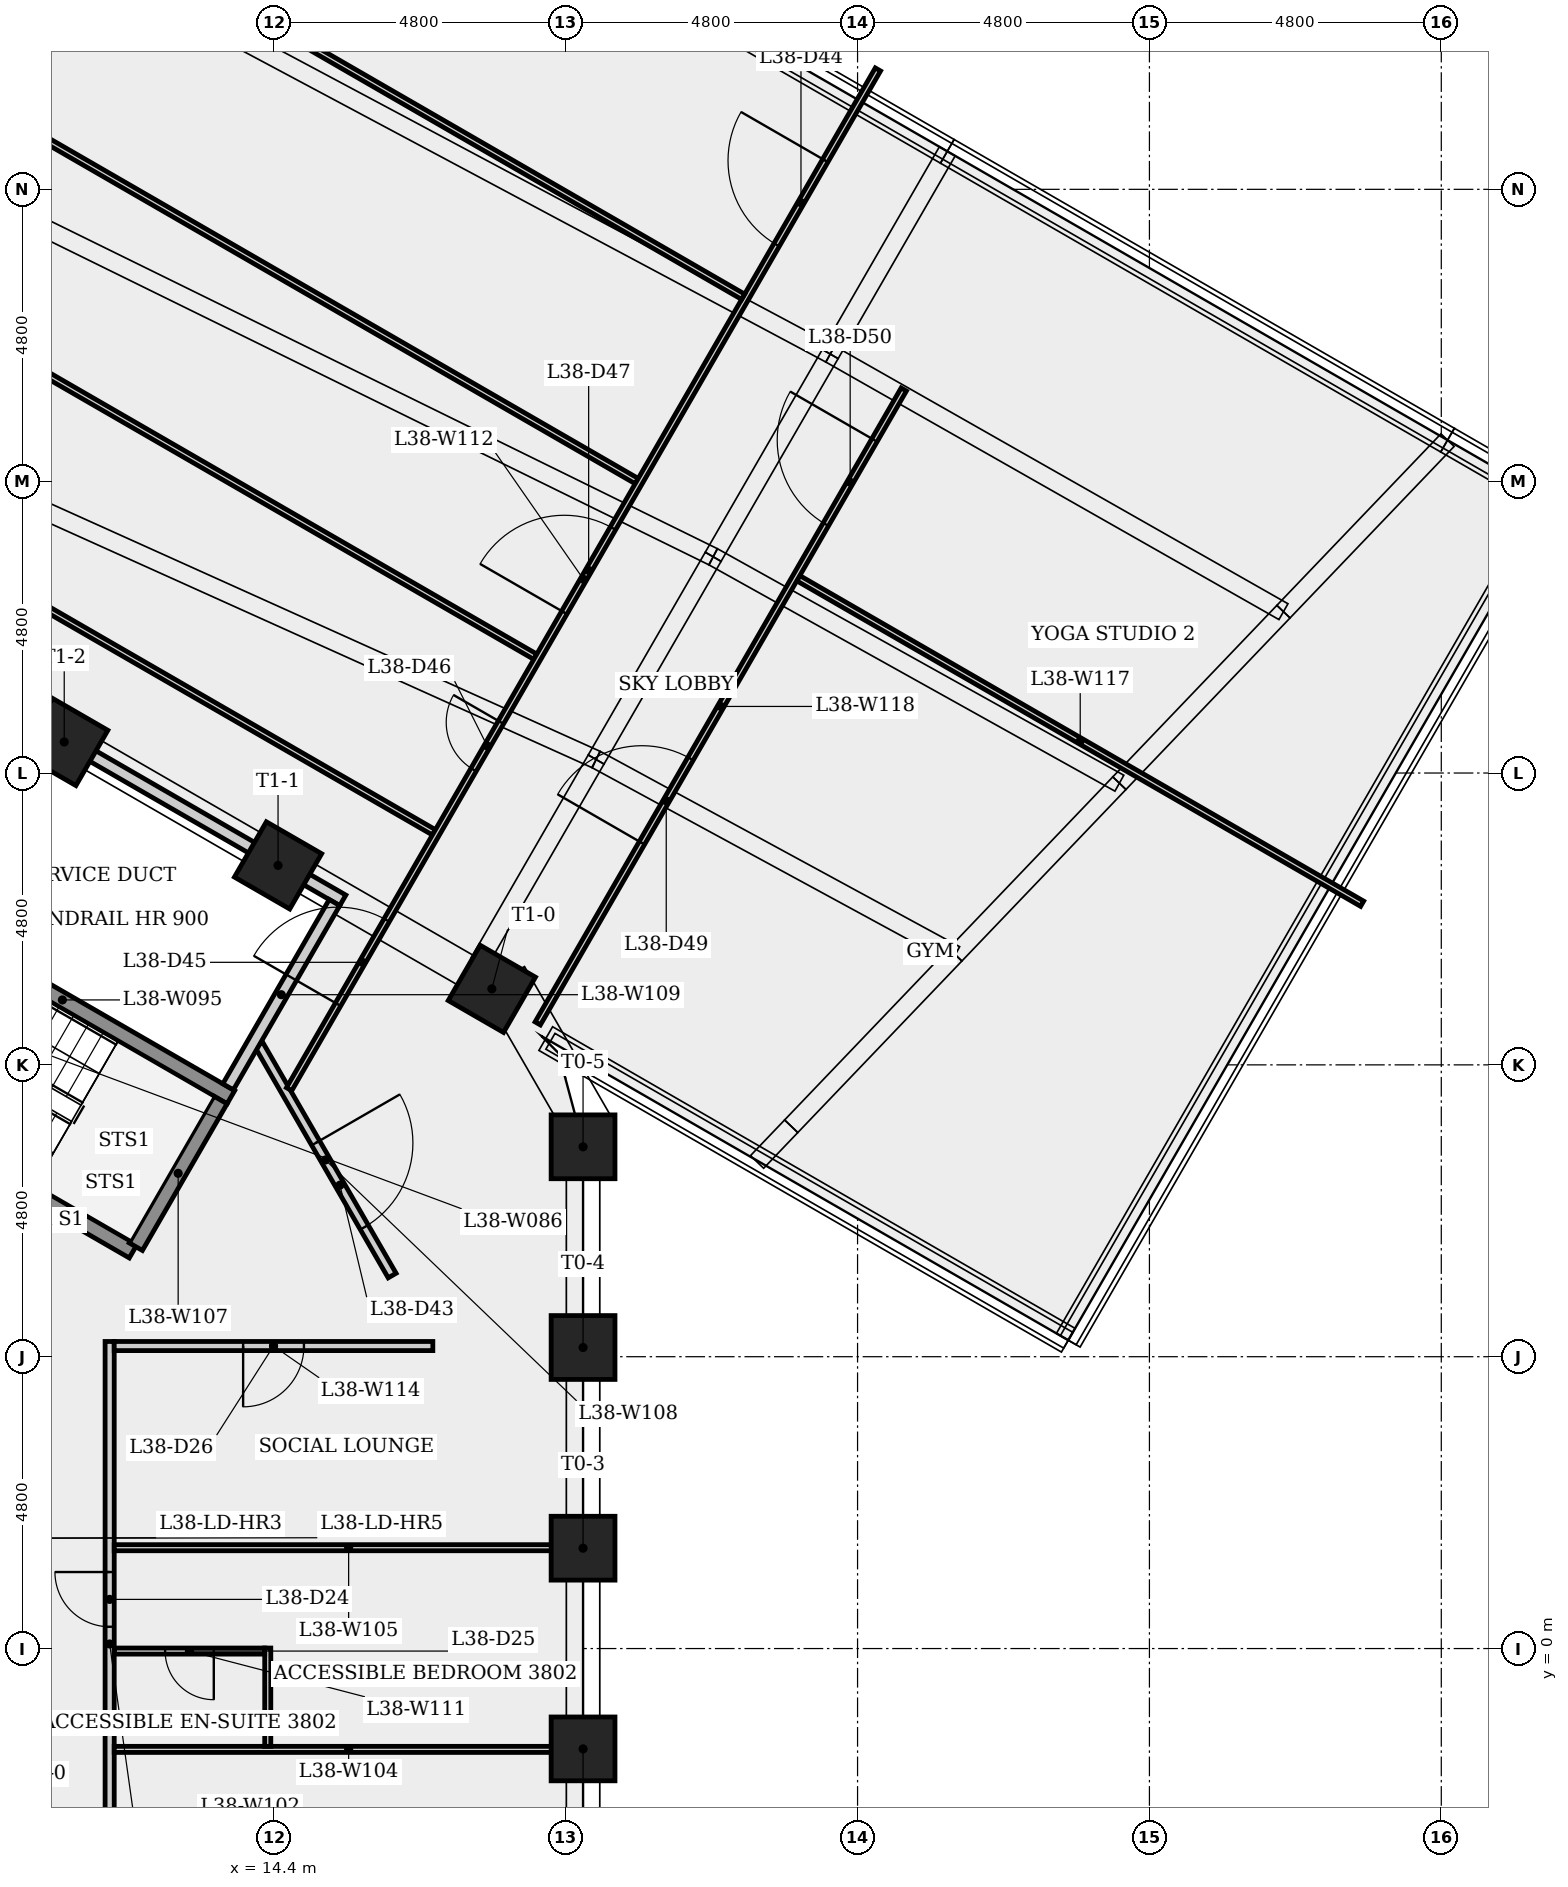
"""IFC4 building model, lengths in metres.
Left out: names, types, materials, properties, quantities, classifications, styles, units other than length and angle.
Written with IfcOpenShell. Run it as: python <this file> out.ifc"""

import sys

from ifc_helpers import new_model, si_unit, direction, frame, frame_2d, origin, origin_2d, place, context, subcontext, project, spatial, rectangle, extrude, element, fill, save


model = new_model("IFC4")
c1 = context("Model", 3, precision=1e-05, world=origin(), true_north=direction((0.0, 1.0)))
c2 = subcontext(c1, "Body", "Model", "MODEL_VIEW")
j1 = project(units=[si_unit("LENGTHUNIT", "METRE"), si_unit("PLANEANGLEUNIT", "RADIAN")], contexts=[c1])
p1 = place(None, origin())
s1 = spatial("IfcSite", under=j1, at=p1, CompositionType="ELEMENT")
p2 = place(p1, origin())
s2 = spatial("IfcBuilding", under=s1, at=p2, CompositionType="ELEMENT")
p3 = place(p2, frame((0.0, 0.0, 143.9)))
s3 = spatial("IfcBuildingStorey", under=s2, at=p3, CompositionType="ELEMENT", Elevation=143.9)
for number, where, z_axis, x_axis in (
    (1, (19.486, -1.65, 0.0), (0.0, 0.0, 1.0), (1.0, 0.0, 0.0)),
    (2, (19.486, 1.65, 0.0), (0.0, 0.0, 1.0), (1.0, 0.0, 0.0)),
    (3, (19.486, 4.951, 0.0), (0.0, 0.0, 1.0), (1.0, 0.0, 0.0)),
    (4, (19.486, 8.252, 0.0), (0.0, 0.0, 1.0), (1.0, 0.0, 0.0)),
    (5, (17.986, 10.85, 0.0), (0.0, 0.0, 1.0), (0.5, 0.866, 0.0)),
    (6, (14.469, 12.88, 0.0), (0.0, 0.0, 1.0), (0.5, 0.866, 0.0)),
    (7, (10.953, 14.911, 0.0), (0.0, 0.0, 1.0), (0.5, 0.866, 0.0)),
):
    element("IfcColumn", number, at=place(p3, frame(where, z_axis=z_axis, x_axis=x_axis)), inside=s3, PredefinedType="COLUMN", context=c2, shape_type="SweptSolid", body=[
        extrude(rectangle(XDim=1.05, YDim=1.05, at=origin_2d()), origin(), (0.0, 0.0, 1.0), 4.0),
    ])
for number, where, z_axis, x_axis in (
    (8, (-4.951, 26.117, 0.0), (0.0, 0.0, 1.0), (0.866, -0.5, 0.0)),
    (9, (-3.283, 29.005, 0.0), (0.0, 0.0, 1.0), (0.866, -0.5, 0.0)),
    (10, (-1.615, 31.894, 0.0), (0.0, 0.0, 1.0), (0.866, -0.5, 0.0)),
):
    element("IfcWall", number, at=place(p3, frame(where, z_axis=z_axis, x_axis=x_axis)), inside=s3, PredefinedType="PARTITIONING", context=c2, shape_type="SweptSolid", body=[
        extrude(rectangle(XDim=25.385, YDim=0.1, at=frame_2d((12.692, 0.0))), origin(), (0.0, 0.0, 1.0), 3.6),
    ])
p4 = place(p3, frame((3.063, 19.506, 0.0), z_axis=(0.0, 0.0, 1.0), x_axis=(0.866025783705, -0.499999341958, 0.0)))
e11 = element("IfcWall", 11, at=p4, inside=s3, PredefinedType="PLUMBINGWALL", context=c2, shape_type="SweptSolid", body=[
    extrude(rectangle(XDim=14.4, YDim=0.2, at=frame_2d((7.2, 0.0))), origin(), (0.0, 0.0, 1.0), 2.725),
])
p5 = place(p3, frame((8.151, 12.268, 0.0), z_axis=(0.0, 0.0, 1.0), x_axis=(0.866025499775, -0.499999833739, 0.0)))
e12 = element("IfcWall", 12, at=p5, inside=s3, PredefinedType="SHEAR", context=c2, shape_type="SweptSolid", body=[
    extrude(rectangle(XDim=6.4, YDim=0.25, at=frame_2d((3.2, 0.0))), origin(), (0.0, 0.0, 1.0), 3.6),
])
p6 = place(p3, frame((11.1, 7.101, 0.0), z_axis=(0.0, 0.0, 1.0), x_axis=(-0.8660265141, 0.499998076872, 0.0)))
e13 = element("IfcWall", 13, at=p6, inside=s3, PredefinedType="SHEAR", context=c2, shape_type="SweptSolid", body=[
    extrude(rectangle(XDim=5.137, YDim=0.25, at=frame_2d((2.569, 0.0))), origin(), (0.0, 0.0, 1.0), 3.6),
])
p7 = place(p6, frame((3.987, 0.0, 0.0)))
e14 = element("IfcOpeningElement", 14, at=p7, cuts=e13, PredefinedType="OPENING", context=c2, shape_type="SweptSolid", body=[
    extrude(rectangle(XDim=1.0, YDim=2.1, at=frame_2d((0.5, 1.05))), frame((0.0, 0.135, 0.0), z_axis=(0.0, -1.0, 0.0), x_axis=(1.0, 0.0, 0.0)), (0.0, 0.0, 1.0), 0.27),
])
p8 = place(p3, frame((11.7, -4.9, 0.0), z_axis=(0.0, 0.0, 1.0), x_axis=(0.0, 1.0, 0.0)))
e15 = element("IfcWall", 15, at=p8, inside=s3, PredefinedType="PARTITIONING", context=c2, shape_type="SweptSolid", body=[
    extrude(rectangle(XDim=9.951, YDim=0.15, at=frame_2d((4.976, 0.0))), origin(), (0.0, 0.0, 1.0), 3.6),
])
p9 = place(p8, frame((5.259, 0.0, 0.0)))
e16 = element("IfcOpeningElement", 16, at=p9, cuts=e15, PredefinedType="OPENING", context=c2, shape_type="SweptSolid", body=[
    extrude(rectangle(XDim=0.9, YDim=2.1, at=frame_2d((0.45, 1.05))), frame((0.0, 0.085, 0.0), z_axis=(0.0, -1.0, 0.0), x_axis=(1.0, 0.0, 0.0)), (0.0, 0.0, 1.0), 0.17),
])
for number, where, z_axis, x_axis in (
    (17, (11.775, -1.658, 0.0), (0.0, 0.0, 1.0), (1.0, 0.0, 0.0)),
    (18, (11.775, 1.658, 0.0), (0.0, 0.0, 1.0), (1.0, 0.0, 0.0)),
):
    element("IfcWall", number, at=place(p3, frame(where, z_axis=z_axis, x_axis=x_axis)), inside=s3, PredefinedType="PARTITIONING", context=c2, shape_type="SweptSolid", body=[
        extrude(rectangle(XDim=7.711, YDim=0.1, at=frame_2d((3.855, 0.0))), origin(), (0.0, 0.0, 1.0), 3.6),
    ])
p10 = place(p3, frame((12.085, 6.532, 0.0), z_axis=(0.0, 0.0, 1.0), x_axis=(-0.86604373436, 0.499968249168, 0.0)))
e19 = element("IfcWall", 19, at=p10, inside=s3, PredefinedType="SHEAR", context=c2, shape_type="SweptSolid", body=[
    extrude(rectangle(XDim=1.118, YDim=0.25, at=frame_2d((0.559, 0.0))), origin(), (0.0, 0.0, 1.0), 3.6),
])
p11 = place(p3, frame((13.523, 9.022, 0.0), z_axis=(0.0, 0.0, 1.0), x_axis=(-0.500013277472, -0.866017737897, 0.0)))
e20 = element("IfcWall", 20, at=p11, inside=s3, PredefinedType="SHEAR", context=c2, shape_type="SweptSolid", body=[
    extrude(rectangle(XDim=2.786, YDim=0.25, at=frame_2d((1.393, 0.0))), origin(), (0.0, 0.0, 1.0), 3.6),
])
p12 = place(p3, frame((14.151, 9.937, 0.0), z_axis=(0.0, 0.0, 1.0), x_axis=(0.500038547485, -0.86600314724, 0.0)))
e21 = element("IfcWall", 21, at=p12, inside=s3, PredefinedType="PARTITIONING", context=c2, shape_type="SweptSolid", body=[
    extrude(rectangle(XDim=4.39, YDim=0.15, at=frame_2d((2.195, 0.0))), origin(), (0.0, 0.0, 1.0), 3.6),
])
p13 = place(p12, frame((1.873, 0.0, 0.0)))
e22 = element("IfcOpeningElement", 22, at=p13, cuts=e21, PredefinedType="OPENING", context=c2, shape_type="SweptSolid", body=[
    extrude(rectangle(XDim=1.6, YDim=2.1, at=frame_2d((0.8, 1.05))), frame((0.0, 0.085, 0.0), z_axis=(0.0, -1.0, 0.0), x_axis=(1.0, 0.0, 0.0)), (0.0, 0.0, 1.0), 0.17),
])
p14 = place(p3, frame((13.648, 9.239, 0.0), z_axis=(0.0, 0.0, 1.0), x_axis=(0.49996604514, 0.866045006744, 0.0)))
e23 = element("IfcWall", 23, at=p14, inside=s3, PredefinedType="PLUMBINGWALL", context=c2, shape_type="SweptSolid", body=[
    extrude(rectangle(XDim=3.499, YDim=0.2, at=frame_2d((1.75, 0.0))), origin(), (0.0, 0.0, 1.0), 3.6),
])
p15 = place(p3, frame((14.3, -1.608, 0.0), z_axis=(0.0, 0.0, 1.0), x_axis=(0.0, 1.0, 0.0)))
e24 = element("IfcWall", 24, at=p15, inside=s3, PredefinedType="PARTITIONING", context=c2, shape_type="SweptSolid", body=[
    extrude(rectangle(XDim=1.617, YDim=0.1, at=frame_2d((0.809, 0.0))), origin(), (0.0, 0.0, 1.0), 3.6),
])
p16 = place(p3, frame((14.25, -0.042, 0.0), z_axis=(0.0, 0.0, 1.0), x_axis=(-1.0, 0.0, 0.0)))
e25 = element("IfcWall", 25, at=p16, inside=s3, PredefinedType="PARTITIONING", context=c2, shape_type="SweptSolid", body=[
    extrude(rectangle(XDim=2.475, YDim=0.1, at=frame_2d((1.238, 0.0))), origin(), (0.0, 0.0, 1.0), 3.6),
])
p17 = place(p16, frame((0.837, 0.0, 0.0)))
e26 = element("IfcOpeningElement", 26, at=p17, cuts=e25, PredefinedType="OPENING", context=c2, shape_type="SweptSolid", body=[
    extrude(rectangle(XDim=0.8, YDim=2.1, at=frame_2d((0.4, 1.05))), frame((0.0, 0.06, 0.0), z_axis=(0.0, -1.0, 0.0), x_axis=(1.0, 0.0, 0.0)), (0.0, 0.0, 1.0), 0.12),
])
p18 = place(p3, frame((14.651, 9.2, 0.0), z_axis=(0.0, 0.0, 1.0), x_axis=(0.500009799479, 0.866019745978, 0.0)))
e27 = element("IfcWall", 27, at=p18, inside=s3, PredefinedType="PARTITIONING", context=c2, shape_type="SweptSolid", body=[
    extrude(rectangle(XDim=19.367, YDim=0.1, at=frame_2d((9.684, 0.0))), origin(), (0.0, 0.0, 1.0), 3.6),
])
p19 = place(p18, frame((16.036, 0.0, 0.0)))
e28 = element("IfcOpeningElement", 28, at=p19, cuts=e27, PredefinedType="OPENING", context=c2, shape_type="SweptSolid", body=[
    extrude(rectangle(XDim=1.6, YDim=2.1, at=frame_2d((0.8, 1.05))), frame((0.0, 0.06, 0.0), z_axis=(0.0, -1.0, 0.0), x_axis=(1.0, 0.0, 0.0)), (0.0, 0.0, 1.0), 0.12),
])
p20 = place(p18, frame((1.61, 0.0, 0.0)))
e29 = element("IfcOpeningElement", 29, at=p20, cuts=e27, PredefinedType="OPENING", context=c2, shape_type="SweptSolid", body=[
    extrude(rectangle(XDim=1.6, YDim=2.1, at=frame_2d((0.8, 1.05))), frame((0.0, 0.06, 0.0), z_axis=(0.0, -1.0, 0.0), x_axis=(1.0, 0.0, 0.0)), (0.0, 0.0, 1.0), 0.12),
])
p21 = place(p18, frame((6.067, 0.0, 0.0)))
e30 = element("IfcOpeningElement", 30, at=p21, cuts=e27, PredefinedType="OPENING", context=c2, shape_type="SweptSolid", body=[
    extrude(rectangle(XDim=0.9, YDim=2.1, at=frame_2d((0.45, 1.05))), frame((0.0, 0.06, 0.0), z_axis=(0.0, -1.0, 0.0), x_axis=(1.0, 0.0, 0.0)), (0.0, 0.0, 1.0), 0.12),
])
p22 = place(p18, frame((9.053, 0.0, 0.0)))
e31 = element("IfcOpeningElement", 31, at=p22, cuts=e27, PredefinedType="OPENING", context=c2, shape_type="SweptSolid", body=[
    extrude(rectangle(XDim=1.6, YDim=2.1, at=frame_2d((0.8, 1.05))), frame((0.0, 0.06, 0.0), z_axis=(0.0, -1.0, 0.0), x_axis=(1.0, 0.0, 0.0)), (0.0, 0.0, 1.0), 0.12),
])
p23 = place(p3, frame((17.015, 4.976, 0.0), z_axis=(0.0, 0.0, 1.0), x_axis=(-1.0, 0.0, 0.0)))
e32 = element("IfcWall", 32, at=p23, inside=s3, PredefinedType="PARTITIONING", context=c2, shape_type="SweptSolid", body=[
    extrude(rectangle(XDim=5.24, YDim=0.15, at=frame_2d((2.62, 0.0))), origin(), (0.0, 0.0, 1.0), 3.6),
])
p24 = place(p23, frame((2.12, 0.0, 0.0)))
e33 = element("IfcOpeningElement", 33, at=p24, cuts=e32, PredefinedType="OPENING", context=c2, shape_type="SweptSolid", body=[
    extrude(rectangle(XDim=1.0, YDim=2.1, at=frame_2d((0.5, 1.05))), frame((0.0, 0.085, 0.0), z_axis=(0.0, -1.0, 0.0), x_axis=(1.0, 0.0, 0.0)), (0.0, 0.0, 1.0), 0.17),
])
p25 = place(p3, frame((22.119, 22.233, 0.0), z_axis=(0.0, 0.0, 1.0), x_axis=(-0.866027506852, 0.499996357363, 0.0)))
e34 = element("IfcWall", 34, at=p25, inside=s3, PredefinedType="PARTITIONING", context=c2, shape_type="SweptSolid", body=[
    extrude(rectangle(XDim=25.385, YDim=0.1, at=frame_2d((12.692, 0.0))), origin(), (0.0, 0.0, 1.0), 3.275),
])
p26 = place(p25, frame((11.819, 0.0, 0.0)))
e35 = element("IfcOpeningElement", 35, at=p26, cuts=e34, PredefinedType="OPENING", context=c2, shape_type="SweptSolid", body=[
    extrude(rectangle(XDim=1.0, YDim=2.1, at=frame_2d((0.5, 1.05))), frame((0.0, 0.06, 0.0), z_axis=(0.0, -1.0, 0.0), x_axis=(1.0, 0.0, 0.0)), (0.0, 0.0, 1.0), 0.12),
])
p27 = place(p3, frame((23.025, 17.604, 0.0), z_axis=(0.0, 0.0, 1.0), x_axis=(0.866024593443, -0.500001403549, 0.0)))
e36 = element("IfcWall", 36, at=p27, inside=s3, PredefinedType="PARTITIONING", context=c2, shape_type="SweptSolid", body=[
    extrude(rectangle(XDim=10.708, YDim=0.1, at=frame_2d((5.354, 0.0))), origin(), (0.0, 0.0, 1.0), 3.6),
])
p28 = place(p3, frame((18.74, 10.282, 0.0), z_axis=(0.0, 0.0, 1.0), x_axis=(0.50000797982, 0.866020796584, 0.0)))
e37 = element("IfcWall", 37, at=p28, inside=s3, PredefinedType="PARTITIONING", context=c2, shape_type="SweptSolid", body=[
    extrude(rectangle(XDim=12.04, YDim=0.1, at=frame_2d((6.02, 0.0))), origin(), (0.0, 0.0, 1.0), 3.6),
])
p29 = place(p28, frame((3.427, 0.0, 0.0)))
e38 = element("IfcOpeningElement", 38, at=p29, cuts=e37, PredefinedType="OPENING", context=c2, shape_type="SweptSolid", body=[
    extrude(rectangle(XDim=1.6, YDim=2.1, at=frame_2d((0.8, 1.05))), frame((0.0, 0.06, 0.0), z_axis=(0.0, -1.0, 0.0), x_axis=(1.0, 0.0, 0.0)), (0.0, 0.0, 1.0), 0.12),
])
p30 = place(p28, frame((9.477, 0.0, 0.0)))
e39 = element("IfcOpeningElement", 39, at=p30, cuts=e37, PredefinedType="OPENING", context=c2, shape_type="SweptSolid", body=[
    extrude(rectangle(XDim=1.6, YDim=2.1, at=frame_2d((0.8, 1.05))), frame((0.0, 0.06, 0.0), z_axis=(0.0, -1.0, 0.0), x_axis=(1.0, 0.0, 0.0)), (0.0, 0.0, 1.0), 0.12),
])
p31 = place(p9, origin())
e40 = element("IfcDoor", 40, at=p31, inside=s3, OperationType="SINGLE_SWING_RIGHT", PredefinedType="DOOR", context=c2, shape_type="SweptSolid", body=[
    extrude(rectangle(XDim=0.9, YDim=2.1, at=frame_2d((0.45, 1.05))), frame((0.0, 0.025, 0.0), z_axis=(0.0, -1.0, 0.0), x_axis=(1.0, 0.0, 0.0)), (0.0, 0.0, 1.0), 0.05),
])
fill(e16, e40)
p32 = place(p17, origin())
e41 = element("IfcDoor", 41, at=p32, inside=s3, OperationType="SINGLE_SWING_LEFT", PredefinedType="DOOR", context=c2, shape_type="SweptSolid", body=[
    extrude(rectangle(XDim=0.8, YDim=2.1, at=frame_2d((0.4, 1.05))), frame((0.0, 0.025, 0.0), z_axis=(0.0, -1.0, 0.0), x_axis=(1.0, 0.0, 0.0)), (0.0, 0.0, 1.0), 0.05),
])
fill(e26, e41)
p33 = place(p24, origin())
e42 = element("IfcDoor", 42, at=p33, inside=s3, OperationType="SINGLE_SWING_RIGHT", PredefinedType="DOOR", context=c2, shape_type="SweptSolid", body=[
    extrude(rectangle(XDim=1.0, YDim=2.1, at=frame_2d((0.5, 1.05))), frame((0.0, 0.025, 0.0), z_axis=(0.0, -1.0, 0.0), x_axis=(1.0, 0.0, 0.0)), (0.0, 0.0, 1.0), 0.05),
])
fill(e33, e42)
p34 = place(p13, origin())
e43 = element("IfcDoor", 43, at=p34, inside=s3, OperationType="SINGLE_SWING_LEFT", PredefinedType="DOOR", context=c2, shape_type="SweptSolid", body=[
    extrude(rectangle(XDim=1.6, YDim=2.1, at=frame_2d((0.8, 1.05))), frame((0.0, 0.025, 0.0), z_axis=(0.0, -1.0, 0.0), x_axis=(1.0, 0.0, 0.0)), (0.0, 0.0, 1.0), 0.05),
])
fill(e22, e43)
p35 = place(p19, origin())
e44 = element("IfcDoor", 44, at=p35, inside=s3, OperationType="SINGLE_SWING_RIGHT", PredefinedType="DOOR", context=c2, shape_type="SweptSolid", body=[
    extrude(rectangle(XDim=1.6, YDim=2.1, at=frame_2d((0.8, 1.05))), frame((0.0, 0.025, 0.0), z_axis=(0.0, -1.0, 0.0), x_axis=(1.0, 0.0, 0.0)), (0.0, 0.0, 1.0), 0.05),
])
fill(e28, e44)
p36 = place(p20, origin())
e45 = element("IfcDoor", 45, at=p36, inside=s3, OperationType="SINGLE_SWING_LEFT", PredefinedType="DOOR", context=c2, shape_type="SweptSolid", body=[
    extrude(rectangle(XDim=1.6, YDim=2.1, at=frame_2d((0.8, 1.05))), frame((0.0, 0.025, 0.0), z_axis=(0.0, -1.0, 0.0), x_axis=(1.0, 0.0, 0.0)), (0.0, 0.0, 1.0), 0.05),
])
fill(e29, e45)
p37 = place(p21, origin())
e46 = element("IfcDoor", 46, at=p37, inside=s3, OperationType="SINGLE_SWING_RIGHT", PredefinedType="DOOR", context=c2, shape_type="SweptSolid", body=[
    extrude(rectangle(XDim=0.9, YDim=2.1, at=frame_2d((0.45, 1.05))), frame((0.0, 0.025, 0.0), z_axis=(0.0, -1.0, 0.0), x_axis=(1.0, 0.0, 0.0)), (0.0, 0.0, 1.0), 0.05),
])
fill(e30, e46)
p38 = place(p22, origin())
e47 = element("IfcDoor", 47, at=p38, inside=s3, OperationType="SINGLE_SWING_LEFT", PredefinedType="DOOR", context=c2, shape_type="SweptSolid", body=[
    extrude(rectangle(XDim=1.6, YDim=2.1, at=frame_2d((0.8, 1.05))), frame((0.0, 0.025, 0.0), z_axis=(0.0, -1.0, 0.0), x_axis=(1.0, 0.0, 0.0)), (0.0, 0.0, 1.0), 0.05),
])
fill(e31, e47)
p39 = place(p29, origin())
e48 = element("IfcDoor", 48, at=p39, inside=s3, OperationType="SINGLE_SWING_LEFT", PredefinedType="DOOR", context=c2, shape_type="SweptSolid", body=[
    extrude(rectangle(XDim=1.6, YDim=2.1, at=frame_2d((0.8, 1.05))), frame((0.0, 0.025, 0.0), z_axis=(0.0, -1.0, 0.0), x_axis=(1.0, 0.0, 0.0)), (0.0, 0.0, 1.0), 0.05),
])
fill(e38, e48)
p40 = place(p30, origin())
e49 = element("IfcDoor", 49, at=p40, inside=s3, OperationType="SINGLE_SWING_RIGHT", PredefinedType="DOOR", context=c2, shape_type="SweptSolid", body=[
    extrude(rectangle(XDim=1.6, YDim=2.1, at=frame_2d((0.8, 1.05))), frame((0.0, 0.025, 0.0), z_axis=(0.0, -1.0, 0.0), x_axis=(1.0, 0.0, 0.0)), (0.0, 0.0, 1.0), 0.05),
])
fill(e39, e49)
save(model, sys.argv[1])
